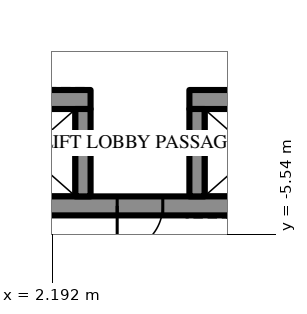
"""IFC4 building model, lengths in metres.
Left out: names, types, materials, properties, quantities, classifications, styles, units other than length and angle.
Written with IfcOpenShell. Run it as: python <this file> out.ifc"""

import sys

from ifc_helpers import new_model, si_unit, direction, frame, frame_2d, origin, place, context, subcontext, project, spatial, rectangle, extrude, element, fill, save


model = new_model("IFC4")
c1 = context("Model", 3, precision=1e-05, world=origin(), true_north=direction((0.0, 1.0)))
c2 = subcontext(c1, "Body", "Model", "MODEL_VIEW")
j1 = project(units=[si_unit("LENGTHUNIT", "METRE"), si_unit("PLANEANGLEUNIT", "RADIAN")], contexts=[c1])
p1 = place(None, origin())
s1 = spatial("IfcSite", under=j1, at=p1, CompositionType="ELEMENT")
p2 = place(p1, origin())
s2 = spatial("IfcBuilding", under=s1, at=p2, CompositionType="ELEMENT")
p3 = place(p2, frame((0.0, 0.0, 90.7)))
s3 = spatial("IfcBuildingStorey", under=s2, at=p3, CompositionType="ELEMENT", Elevation=90.7)
p4 = place(p3, frame((11.7, -2.0, 0.0), z_axis=(0.0, 0.0, 1.0), x_axis=(-1.0, 0.0, 0.0)))
e1 = element("IfcWall", 1, at=p4, inside=s3, PredefinedType="SHEAR", context=c2, shape_type="SweptSolid", body=[
    extrude(rectangle(XDim=5.9, YDim=0.5, at=frame_2d((2.95, 0.0))), origin(), (0.0, 0.0, 1.0), 4.2),
])
p5 = place(p3, frame((3.2, -2.0, 0.0), z_axis=(0.0, 0.0, 1.0), x_axis=(-1.0, 0.0, 0.0)))
e2 = element("IfcWall", 2, at=p5, inside=s3, PredefinedType="SHEAR", context=c2, shape_type="SweptSolid", body=[
    extrude(rectangle(XDim=14.9, YDim=0.5, at=frame_2d((7.45, 0.0))), origin(), (0.0, 0.0, 1.0), 4.2),
])
p6 = place(p5, frame((1.15, 0.0, 0.0)))
e3 = element("IfcOpeningElement", 3, at=p6, cuts=e2, PredefinedType="OPENING", context=c2, shape_type="SweptSolid", body=[
    extrude(rectangle(XDim=1.1, YDim=2.2, at=frame_2d((0.55, 1.1))), frame((0.0, 0.26, 0.0), z_axis=(0.0, -1.0, 0.0), x_axis=(1.0, 0.0, 0.0)), (0.0, 0.0, 1.0), 0.52),
])
p7 = place(p5, frame((4.15, 0.0, 0.0)))
e4 = element("IfcOpeningElement", 4, at=p7, cuts=e2, PredefinedType="OPENING", context=c2, shape_type="SweptSolid", body=[
    extrude(rectangle(XDim=1.1, YDim=2.2, at=frame_2d((0.55, 1.1))), frame((0.0, 0.26, 0.0), z_axis=(0.0, -1.0, 0.0), x_axis=(1.0, 0.0, 0.0)), (0.0, 0.0, 1.0), 0.52),
])
p8 = place(p5, frame((7.15, 0.0, 0.0)))
e5 = element("IfcOpeningElement", 5, at=p8, cuts=e2, PredefinedType="OPENING", context=c2, shape_type="SweptSolid", body=[
    extrude(rectangle(XDim=1.1, YDim=2.2, at=frame_2d((0.55, 1.1))), frame((0.0, 0.26, 0.0), z_axis=(0.0, -1.0, 0.0), x_axis=(1.0, 0.0, 0.0)), (0.0, 0.0, 1.0), 0.52),
])
p9 = place(p5, frame((10.15, 0.0, 0.0)))
e6 = element("IfcOpeningElement", 6, at=p9, cuts=e2, PredefinedType="OPENING", context=c2, shape_type="SweptSolid", body=[
    extrude(rectangle(XDim=1.1, YDim=2.2, at=frame_2d((0.55, 1.1))), frame((0.0, 0.26, 0.0), z_axis=(0.0, -1.0, 0.0), x_axis=(1.0, 0.0, 0.0)), (0.0, 0.0, 1.0), 0.52),
])
p10 = place(p3, frame((11.7, -4.8, 0.0), z_axis=(0.0, 0.0, 1.0), x_axis=(-1.0, 0.0, 0.0)))
e7 = element("IfcWall", 7, at=p10, inside=s3, PredefinedType="SHEAR", context=c2, shape_type="SweptSolid", body=[
    extrude(rectangle(XDim=23.4, YDim=0.5, at=frame_2d((11.7, 0.0))), origin(), (0.0, 0.0, 1.0), 4.2),
])
p11 = place(p10, frame((6.6, 0.0, 0.0)))
e8 = element("IfcOpeningElement", 8, at=p11, cuts=e7, PredefinedType="OPENING", context=c2, shape_type="SweptSolid", body=[
    extrude(rectangle(XDim=1.2, YDim=2.2, at=frame_2d((0.6, 1.1))), frame((0.0, 0.26, 0.0), z_axis=(0.0, -1.0, 0.0), x_axis=(1.0, 0.0, 0.0)), (0.0, 0.0, 1.0), 0.52),
])
p12 = place(p10, frame((3.6, 0.0, 0.0)))
e9 = element("IfcOpeningElement", 9, at=p12, cuts=e7, PredefinedType="OPENING", context=c2, shape_type="SweptSolid", body=[
    extrude(rectangle(XDim=1.2, YDim=2.2, at=frame_2d((0.6, 1.1))), frame((0.0, 0.26, 0.0), z_axis=(0.0, -1.0, 0.0), x_axis=(1.0, 0.0, 0.0)), (0.0, 0.0, 1.0), 0.52),
])
for number, where, z_axis, x_axis in (
    (10, (6.0, -2.25, 0.0), (0.0, 0.0, 1.0), (0.0, -1.0, 0.0)),
    (11, (3.0, -2.25, 0.0), (0.0, 0.0, 1.0), (0.0, -1.0, 0.0)),
):
    element("IfcWall", number, at=place(p3, frame(where, z_axis=z_axis, x_axis=x_axis)), inside=s3, PredefinedType="SHEAR", context=c2, shape_type="SweptSolid", body=[
        extrude(rectangle(XDim=2.3, YDim=0.4, at=frame_2d((1.15, 0.0))), origin(), (0.0, 0.0, 1.0), 4.2),
    ])
p13 = place(p11, origin())
e12 = element("IfcDoor", 12, at=p13, inside=s3, OperationType="SINGLE_SWING_LEFT", PredefinedType="DOOR", context=c2, shape_type="SweptSolid", body=[
    extrude(rectangle(XDim=1.2, YDim=2.2, at=frame_2d((0.6, 1.1))), frame((0.0, 0.025, 0.0), z_axis=(0.0, -1.0, 0.0), x_axis=(1.0, 0.0, 0.0)), (0.0, 0.0, 1.0), 0.05),
])
fill(e8, e12)
save(model, sys.argv[1])
